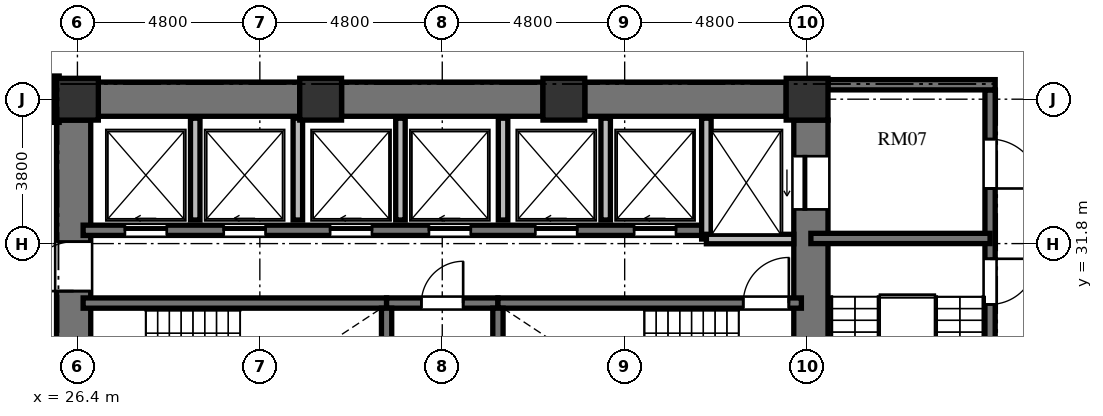
"""IFC4 building model, lengths in metres.
Left out: names, types, materials, properties, quantities, classifications, styles, units other than length and angle.
Written with IfcOpenShell. Run it as: python <this file> out.ifc"""

import sys

from ifc_helpers import new_model, si_unit, direction, frame, frame_2d, origin, origin_2d, place, context, subcontext, project, spatial, rectangle, extrude, element, fill, save


model = new_model("IFC4")
c1 = context("Model", 3, precision=1e-05, world=origin(), true_north=direction((0.0, 1.0)))
c2 = subcontext(c1, "Body", "Model", "MODEL_VIEW")
j1 = project(units=[si_unit("LENGTHUNIT", "METRE"), si_unit("PLANEANGLEUNIT", "RADIAN")], contexts=[c1])
p1 = place(None, origin())
s1 = spatial("IfcSite", under=j1, at=p1, CompositionType="ELEMENT")
p2 = place(p1, origin())
s2 = spatial("IfcBuilding", under=s1, at=p2, CompositionType="ELEMENT")
p3 = place(p2, frame((0.0, 0.0, 76.272)))
s3 = spatial("IfcBuildingStorey", under=s2, at=p3, CompositionType="ELEMENT", Elevation=76.272)
for number, where, z_axis, x_axis in (
    (1, (45.6, 35.6, 0.0), (0.0, 0.0, 1.0), (1.0, 0.0, 0.0)),
    (2, (39.2, 35.6, 0.0), (0.0, 0.0, 1.0), (1.0, 0.0, 0.0)),
    (3, (32.8, 35.6, 0.0), (0.0, 0.0, 1.0), (1.0, 0.0, 0.0)),
    (4, (26.4, 35.6, 0.0), (0.0, 0.0, 1.0), (1.0, 0.0, 0.0)),
):
    element("IfcColumn", number, at=place(p3, frame(where, z_axis=z_axis, x_axis=x_axis)), inside=s3, PredefinedType="COLUMN", context=c2, shape_type="SweptSolid", body=[
        extrude(rectangle(XDim=1.1, YDim=1.1, at=origin_2d()), origin(), (0.0, 0.0, 1.0), 5.472),
    ])
p4 = place(p3, frame((26.3, 20.95, 0.0), z_axis=(0.0, 0.0, 1.0), x_axis=(0.0, 1.0, 0.0)))
e5 = element("IfcWall", 5, at=p4, inside=s3, PredefinedType="SHEAR", context=c2, shape_type="SweptSolid", body=[
    extrude(rectangle(XDim=14.1, YDim=0.9, at=frame_2d((7.05, 0.0))), origin(), (0.0, 0.0, 1.0), 5.472),
])
p5 = place(p4, frame((6.5, 0.0, 0.0)))
e6 = element("IfcOpeningElement", 6, at=p5, cuts=e5, PredefinedType="OPENING", context=c2, shape_type="SweptSolid", body=[
    extrude(rectangle(XDim=1.2, YDim=2.15, at=frame_2d((0.6, 1.075))), frame((0.0, 0.46, 0.0), z_axis=(0.0, -1.0, 0.0), x_axis=(1.0, 0.0, 0.0)), (0.0, 0.0, 1.0), 0.92),
])
p6 = place(p4, frame((9.6, 0.0, 0.0)))
e7 = element("IfcOpeningElement", 7, at=p6, cuts=e5, PredefinedType="OPENING", context=c2, shape_type="SweptSolid", body=[
    extrude(rectangle(XDim=1.3, YDim=2.2, at=frame_2d((0.65, 1.1))), frame((0.0, 0.46, 0.0), z_axis=(0.0, -1.0, 0.0), x_axis=(1.0, 0.0, 0.0)), (0.0, 0.0, 1.0), 0.92),
])
p7 = place(p4, frame((3.26, 0.0, 0.0)))
e8 = element("IfcOpeningElement", 8, at=p7, cuts=e5, PredefinedType="OPENING", context=c2, shape_type="SweptSolid", body=[
    extrude(rectangle(XDim=1.3, YDim=2.2, at=frame_2d((0.65, 1.1))), frame((0.0, 0.46, 0.0), z_axis=(0.0, -1.0, 0.0), x_axis=(1.0, 0.0, 0.0)), (0.0, 0.0, 1.0), 0.92),
])
p8 = place(p3, frame((45.7, 20.95, 0.0), z_axis=(0.0, 0.0, 1.0), x_axis=(0.0, 1.0, 0.0)))
e9 = element("IfcWall", 9, at=p8, inside=s3, PredefinedType="SHEAR", context=c2, shape_type="SweptSolid", body=[
    extrude(rectangle(XDim=14.1, YDim=0.9, at=frame_2d((7.05, 0.0))), origin(), (0.0, 0.0, 1.0), 5.472),
])
p9 = place(p8, frame((11.75, 0.0, 0.0)))
e10 = element("IfcOpeningElement", 10, at=p9, cuts=e9, PredefinedType="OPENING", context=c2, shape_type="SweptSolid", body=[
    extrude(rectangle(XDim=1.4, YDim=2.3, at=frame_2d((0.7, 1.15))), frame((0.0, 0.46, 0.0), z_axis=(0.0, -1.0, 0.0), x_axis=(1.0, 0.0, 0.0)), (0.0, 0.0, 1.0), 0.92),
])
p10 = place(p8, frame((0.95, 0.0, 0.0)))
e11 = element("IfcOpeningElement", 11, at=p10, cuts=e9, PredefinedType="OPENING", context=c2, shape_type="SweptSolid", body=[
    extrude(rectangle(XDim=1.4, YDim=2.3, at=frame_2d((0.7, 1.15))), frame((0.0, 0.46, 0.0), z_axis=(0.0, -1.0, 0.0), x_axis=(1.0, 0.0, 0.0)), (0.0, 0.0, 1.0), 0.92),
])
p11 = place(p3, frame((26.95, 35.6, 0.0), z_axis=(0.0, 0.0, 1.0), x_axis=(1.0, 0.0, 0.0)))
e12 = element("IfcWall", 12, at=p11, inside=s3, PredefinedType="SHEAR", context=c2, shape_type="SweptSolid", body=[
    extrude(rectangle(XDim=5.3, YDim=0.9, at=frame_2d((2.65, 0.0))), origin(), (0.0, 0.0, 1.0), 5.472),
])
p12 = place(p3, frame((33.35, 35.6, 0.0), z_axis=(0.0, 0.0, 1.0), x_axis=(1.0, 0.0, 0.0)))
e13 = element("IfcWall", 13, at=p12, inside=s3, PredefinedType="SHEAR", context=c2, shape_type="SweptSolid", body=[
    extrude(rectangle(XDim=5.3, YDim=0.9, at=frame_2d((2.65, 0.0))), origin(), (0.0, 0.0, 1.0), 5.472),
])
p13 = place(p3, frame((39.75, 35.6, 0.0), z_axis=(0.0, 0.0, 1.0), x_axis=(1.0, 0.0, 0.0)))
e14 = element("IfcWall", 14, at=p13, inside=s3, PredefinedType="SHEAR", context=c2, shape_type="SweptSolid", body=[
    extrude(rectangle(XDim=5.3, YDim=0.9, at=frame_2d((2.65, 0.0))), origin(), (0.0, 0.0, 1.0), 5.472),
])
p14 = place(p3, frame((26.55, 30.235, 0.0), z_axis=(0.0, 0.0, 1.0), x_axis=(1.0, 0.0, 0.0)))
e15 = element("IfcWall", 15, at=p14, inside=s3, PredefinedType="SHEAR", context=c2, shape_type="SweptSolid", body=[
    extrude(rectangle(XDim=7.985, YDim=0.27, at=frame_2d((3.992, 0.0))), origin(), (0.0, 0.0, 1.0), 5.472),
])
p15 = place(p3, frame((34.535, 30.235, 0.0), z_axis=(0.0, 0.0, 1.0), x_axis=(1.0, 0.0, 0.0)))
e16 = element("IfcWall", 16, at=p15, inside=s3, PredefinedType="SHEAR", context=c2, shape_type="SweptSolid", body=[
    extrude(rectangle(XDim=2.93, YDim=0.27, at=frame_2d((1.465, 0.0))), origin(), (0.0, 0.0, 1.0), 5.472),
])
p16 = place(p15, frame((0.915, 0.0, 0.0)))
e17 = element("IfcOpeningElement", 17, at=p16, cuts=e16, PredefinedType="OPENING", context=c2, shape_type="SweptSolid", body=[
    extrude(rectangle(XDim=1.1, YDim=2.15, at=frame_2d((0.55, 1.075))), frame((0.0, 0.145, 0.0), z_axis=(0.0, -1.0, 0.0), x_axis=(1.0, 0.0, 0.0)), (0.0, 0.0, 1.0), 0.29),
])
p17 = place(p3, frame((37.465, 30.235, 0.0), z_axis=(0.0, 0.0, 1.0), x_axis=(1.0, 0.0, 0.0)))
e18 = element("IfcWall", 18, at=p17, inside=s3, PredefinedType="SHEAR", context=c2, shape_type="SweptSolid", body=[
    extrude(rectangle(XDim=7.985, YDim=0.27, at=frame_2d((3.992, 0.0))), origin(), (0.0, 0.0, 1.0), 5.472),
])
p18 = place(p17, frame((6.455, 0.0, 0.0)))
e19 = element("IfcOpeningElement", 19, at=p18, cuts=e18, PredefinedType="OPENING", context=c2, shape_type="SweptSolid", body=[
    extrude(rectangle(XDim=1.2, YDim=2.15, at=frame_2d((0.6, 1.075))), frame((0.0, 0.145, 0.0), z_axis=(0.0, -1.0, 0.0), x_axis=(1.0, 0.0, 0.0)), (0.0, 0.0, 1.0), 0.29),
])
for number, where, z_axis, x_axis in (
    (20, (34.535, 26.02, 0.0), (0.0, 0.0, 1.0), (0.0, 1.0, 0.0)),
    (21, (37.465, 26.02, 0.0), (0.0, 0.0, 1.0), (0.0, 1.0, 0.0)),
):
    element("IfcWall", number, at=place(p3, frame(where, z_axis=z_axis, x_axis=x_axis)), inside=s3, PredefinedType="SHEAR", context=c2, shape_type="SweptSolid", body=[
        extrude(rectangle(XDim=4.08, YDim=0.27, at=frame_2d((2.04, 0.0))), origin(), (0.0, 0.0, 1.0), 5.472),
    ])
p19 = place(p3, frame((26.55, 32.15, 0.0), z_axis=(0.0, 0.0, 1.0), x_axis=(1.0, 0.0, 0.0)))
e22 = element("IfcWall", 22, at=p19, inside=s3, PredefinedType="SHEAR", context=c2, shape_type="SweptSolid", body=[
    extrude(rectangle(XDim=16.4, YDim=0.27, at=frame_2d((8.2, 0.0))), origin(), (0.0, 0.0, 1.0), 5.472),
])
p20 = place(p19, frame((1.1, 0.0, 0.0)))
e23 = element("IfcOpeningElement", 23, at=p20, cuts=e22, PredefinedType="OPENING", context=c2, shape_type="SweptSolid", body=[
    extrude(rectangle(XDim=1.1, YDim=2.2, at=frame_2d((0.55, 1.1))), frame((0.0, 0.145, 0.0), z_axis=(0.0, -1.0, 0.0), x_axis=(1.0, 0.0, 0.0)), (0.0, 0.0, 1.0), 0.29),
])
p21 = place(p19, frame((3.7, 0.0, 0.0)))
e24 = element("IfcOpeningElement", 24, at=p21, cuts=e22, PredefinedType="OPENING", context=c2, shape_type="SweptSolid", body=[
    extrude(rectangle(XDim=1.1, YDim=2.2, at=frame_2d((0.55, 1.1))), frame((0.0, 0.145, 0.0), z_axis=(0.0, -1.0, 0.0), x_axis=(1.0, 0.0, 0.0)), (0.0, 0.0, 1.0), 0.29),
])
p22 = place(p19, frame((6.5, 0.0, 0.0)))
e25 = element("IfcOpeningElement", 25, at=p22, cuts=e22, PredefinedType="OPENING", context=c2, shape_type="SweptSolid", body=[
    extrude(rectangle(XDim=1.1, YDim=2.2, at=frame_2d((0.55, 1.1))), frame((0.0, 0.145, 0.0), z_axis=(0.0, -1.0, 0.0), x_axis=(1.0, 0.0, 0.0)), (0.0, 0.0, 1.0), 0.29),
])
p23 = place(p19, frame((9.1, 0.0, 0.0)))
e26 = element("IfcOpeningElement", 26, at=p23, cuts=e22, PredefinedType="OPENING", context=c2, shape_type="SweptSolid", body=[
    extrude(rectangle(XDim=1.1, YDim=2.2, at=frame_2d((0.55, 1.1))), frame((0.0, 0.145, 0.0), z_axis=(0.0, -1.0, 0.0), x_axis=(1.0, 0.0, 0.0)), (0.0, 0.0, 1.0), 0.29),
])
p24 = place(p19, frame((11.9, 0.0, 0.0)))
e27 = element("IfcOpeningElement", 27, at=p24, cuts=e22, PredefinedType="OPENING", context=c2, shape_type="SweptSolid", body=[
    extrude(rectangle(XDim=1.1, YDim=2.2, at=frame_2d((0.55, 1.1))), frame((0.0, 0.145, 0.0), z_axis=(0.0, -1.0, 0.0), x_axis=(1.0, 0.0, 0.0)), (0.0, 0.0, 1.0), 0.29),
])
p25 = place(p19, frame((14.5, 0.0, 0.0)))
e28 = element("IfcOpeningElement", 28, at=p25, cuts=e22, PredefinedType="OPENING", context=c2, shape_type="SweptSolid", body=[
    extrude(rectangle(XDim=1.1, YDim=2.2, at=frame_2d((0.55, 1.1))), frame((0.0, 0.145, 0.0), z_axis=(0.0, -1.0, 0.0), x_axis=(1.0, 0.0, 0.0)), (0.0, 0.0, 1.0), 0.29),
])
p26 = place(p3, frame((42.95, 31.92, 0.0), z_axis=(0.0, 0.0, 1.0), x_axis=(0.0, 1.0, 0.0)))
e29 = element("IfcWall", 29, at=p26, inside=s3, PredefinedType="SOLIDWALL", context=c2, shape_type="SweptSolid", body=[
    extrude(rectangle(XDim=3.18, YDim=0.25, at=frame_2d((1.59, 0.0))), origin(), (0.0, 0.0, 1.0), 5.022),
])
p27 = place(p3, frame((42.95, 31.92, 0.0), z_axis=(0.0, 0.0, 1.0), x_axis=(1.0, 0.0, 0.0)))
e30 = element("IfcWall", 30, at=p27, inside=s3, PredefinedType="SOLIDWALL", context=c2, shape_type="SweptSolid", body=[
    extrude(rectangle(XDim=2.3, YDim=0.25, at=frame_2d((1.15, 0.0))), origin(), (0.0, 0.0, 1.0), 5.022),
])
for number, where, z_axis, x_axis in (
    (31, (29.5, 32.42, 0.0), (0.0, 0.0, 1.0), (0.0, 1.0, 0.0)),
    (32, (32.2, 32.42, 0.0), (0.0, 0.0, 1.0), (0.0, 1.0, 0.0)),
    (33, (34.9, 32.42, 0.0), (0.0, 0.0, 1.0), (0.0, 1.0, 0.0)),
    (34, (37.6, 32.42, 0.0), (0.0, 0.0, 1.0), (0.0, 1.0, 0.0)),
    (35, (40.3, 32.42, 0.0), (0.0, 0.0, 1.0), (0.0, 1.0, 0.0)),
):
    element("IfcWall", number, at=place(p3, frame(where, z_axis=z_axis, x_axis=x_axis)), inside=s3, PredefinedType="SOLIDWALL", context=c2, shape_type="SweptSolid", body=[
        extrude(rectangle(XDim=2.68, YDim=0.25, at=frame_2d((1.34, 0.0))), origin(), (0.0, 0.0, 1.0), 5.022),
    ])
p28 = place(p3, frame((50.415, 35.845, 0.0), z_axis=(0.0, 0.0, 1.0), x_axis=(0.0, -1.0, 0.0)))
e36 = element("IfcWall", 36, at=p28, inside=s3, PredefinedType="SHEAR", context=c2, shape_type="SweptSolid", body=[
    extrude(rectangle(XDim=15.825, YDim=0.27, at=frame_2d((7.913, 0.0))), origin(), (0.0, 0.0, 1.0), 5.472),
])
p29 = place(p28, frame((4.445, 0.0, 0.0)))
e37 = element("IfcOpeningElement", 37, at=p29, cuts=e36, PredefinedType="OPENING", context=c2, shape_type="SweptSolid", body=[
    extrude(rectangle(XDim=1.2, YDim=2.15, at=frame_2d((0.6, 1.075))), frame((0.0, 0.145, 0.0), z_axis=(0.0, -1.0, 0.0), x_axis=(1.0, 0.0, 0.0)), (0.0, 0.0, 1.0), 0.29),
])
p30 = place(p28, frame((1.295, 0.0, 0.0)))
e38 = element("IfcOpeningElement", 38, at=p30, cuts=e36, PredefinedType="OPENING", context=c2, shape_type="SweptSolid", body=[
    extrude(rectangle(XDim=1.3, YDim=2.2, at=frame_2d((0.65, 1.1))), frame((0.0, 0.145, 0.0), z_axis=(0.0, -1.0, 0.0), x_axis=(1.0, 0.0, 0.0)), (0.0, 0.0, 1.0), 0.29),
])
p31 = place(p28, frame((13.095, 0.0, 0.0)))
e39 = element("IfcOpeningElement", 39, at=p31, cuts=e36, PredefinedType="OPENING", context=c2, shape_type="SweptSolid", body=[
    extrude(rectangle(XDim=1.3, YDim=2.2, at=frame_2d((0.65, 1.1))), frame((0.0, 0.145, 0.0), z_axis=(0.0, -1.0, 0.0), x_axis=(1.0, 0.0, 0.0)), (0.0, 0.0, 1.0), 0.29),
])
p32 = place(p3, frame((46.15, 35.98, 0.0), z_axis=(0.0, 0.0, 1.0), x_axis=(1.0, 0.0, 0.0)))
e40 = element("IfcWall", 40, at=p32, inside=s3, PredefinedType="SHEAR", context=c2, shape_type="SweptSolid", body=[
    extrude(rectangle(XDim=4.4, YDim=0.27, at=frame_2d((2.2, 0.0))), origin(), (0.0, 0.0, 1.0), 5.472),
])
p33 = place(p3, frame((45.7, 31.935, 0.0), z_axis=(0.0, 0.0, 1.0), x_axis=(1.0, 0.0, 0.0)))
e41 = element("IfcWall", 41, at=p33, inside=s3, PredefinedType="SHEAR", context=c2, shape_type="SweptSolid", body=[
    extrude(rectangle(XDim=4.715, YDim=0.27, at=frame_2d((2.357, 0.0))), origin(), (0.0, 0.0, 1.0), 5.472),
])
p34 = place(p3, frame((25.83, 36.21, 0.0), z_axis=(0.0, 0.0, 1.0), x_axis=(0.0, -1.0, 0.0)))
e42 = element("IfcWall", 42, at=p34, inside=s3, PredefinedType="PARTITIONING", context=c2, shape_type="SweptSolid", body=[
    extrude(rectangle(XDim=1.22, YDim=0.18, at=frame_2d((0.61, 0.0))), origin(), (0.0, 0.0, 1.0), 5.022),
])
p35 = place(p18, origin())
e43 = element("IfcDoor", 43, at=p35, inside=s3, OperationType="SINGLE_SWING_RIGHT", PredefinedType="DOOR", context=c2, shape_type="SweptSolid", body=[
    extrude(rectangle(XDim=1.2, YDim=2.15, at=frame_2d((0.6, 1.075))), frame((0.0, 0.025, 0.0), z_axis=(0.0, -1.0, 0.0), x_axis=(1.0, 0.0, 0.0)), (0.0, 0.0, 1.0), 0.05),
])
fill(e19, e43)
p36 = place(p16, origin())
e44 = element("IfcDoor", 44, at=p36, inside=s3, OperationType="SINGLE_SWING_RIGHT", PredefinedType="DOOR", context=c2, shape_type="SweptSolid", body=[
    extrude(rectangle(XDim=1.1, YDim=2.15, at=frame_2d((0.55, 1.075))), frame((0.0, 0.025, 0.0), z_axis=(0.0, -1.0, 0.0), x_axis=(1.0, 0.0, 0.0)), (0.0, 0.0, 1.0), 0.05),
])
fill(e17, e44)
p37 = place(p6, origin())
e45 = element("IfcDoor", 45, at=p37, inside=s3, OperationType="SINGLE_SWING_LEFT", PredefinedType="DOOR", context=c2, shape_type="SweptSolid", body=[
    extrude(rectangle(XDim=1.3, YDim=2.2, at=frame_2d((0.65, 1.1))), frame((0.0, 0.025, 0.0), z_axis=(0.0, -1.0, 0.0), x_axis=(1.0, 0.0, 0.0)), (0.0, 0.0, 1.0), 0.05),
])
fill(e7, e45)
p38 = place(p20, origin())
e46 = element("IfcDoor", 46, at=p38, inside=s3, OperationType="SLIDING_TO_LEFT", PredefinedType="DOOR", context=c2, shape_type="SweptSolid", body=[
    extrude(rectangle(XDim=1.1, YDim=2.2, at=frame_2d((0.55, 1.1))), frame((0.0, 0.025, 0.0), z_axis=(0.0, -1.0, 0.0), x_axis=(1.0, 0.0, 0.0)), (0.0, 0.0, 1.0), 0.05),
])
fill(e23, e46)
p39 = place(p21, origin())
e47 = element("IfcDoor", 47, at=p39, inside=s3, OperationType="SLIDING_TO_LEFT", PredefinedType="DOOR", context=c2, shape_type="SweptSolid", body=[
    extrude(rectangle(XDim=1.1, YDim=2.2, at=frame_2d((0.55, 1.1))), frame((0.0, 0.025, 0.0), z_axis=(0.0, -1.0, 0.0), x_axis=(1.0, 0.0, 0.0)), (0.0, 0.0, 1.0), 0.05),
])
fill(e24, e47)
p40 = place(p22, origin())
e48 = element("IfcDoor", 48, at=p40, inside=s3, OperationType="SLIDING_TO_LEFT", PredefinedType="DOOR", context=c2, shape_type="SweptSolid", body=[
    extrude(rectangle(XDim=1.1, YDim=2.2, at=frame_2d((0.55, 1.1))), frame((0.0, 0.025, 0.0), z_axis=(0.0, -1.0, 0.0), x_axis=(1.0, 0.0, 0.0)), (0.0, 0.0, 1.0), 0.05),
])
fill(e25, e48)
p41 = place(p23, origin())
e49 = element("IfcDoor", 49, at=p41, inside=s3, OperationType="SLIDING_TO_LEFT", PredefinedType="DOOR", context=c2, shape_type="SweptSolid", body=[
    extrude(rectangle(XDim=1.1, YDim=2.2, at=frame_2d((0.55, 1.1))), frame((0.0, 0.025, 0.0), z_axis=(0.0, -1.0, 0.0), x_axis=(1.0, 0.0, 0.0)), (0.0, 0.0, 1.0), 0.05),
])
fill(e26, e49)
p42 = place(p24, origin())
e50 = element("IfcDoor", 50, at=p42, inside=s3, OperationType="SLIDING_TO_LEFT", PredefinedType="DOOR", context=c2, shape_type="SweptSolid", body=[
    extrude(rectangle(XDim=1.1, YDim=2.2, at=frame_2d((0.55, 1.1))), frame((0.0, 0.025, 0.0), z_axis=(0.0, -1.0, 0.0), x_axis=(1.0, 0.0, 0.0)), (0.0, 0.0, 1.0), 0.05),
])
fill(e27, e50)
p43 = place(p25, origin())
e51 = element("IfcDoor", 51, at=p43, inside=s3, OperationType="SLIDING_TO_LEFT", PredefinedType="DOOR", context=c2, shape_type="SweptSolid", body=[
    extrude(rectangle(XDim=1.1, YDim=2.2, at=frame_2d((0.55, 1.1))), frame((0.0, 0.025, 0.0), z_axis=(0.0, -1.0, 0.0), x_axis=(1.0, 0.0, 0.0)), (0.0, 0.0, 1.0), 0.05),
])
fill(e28, e51)
p44 = place(p9, origin())
e52 = element("IfcDoor", 52, at=p44, inside=s3, OperationType="SLIDING_TO_LEFT", PredefinedType="DOOR", context=c2, shape_type="SweptSolid", body=[
    extrude(rectangle(XDim=1.4, YDim=2.3, at=frame_2d((0.7, 1.15))), frame((0.0, 0.025, 0.0), z_axis=(0.0, -1.0, 0.0), x_axis=(1.0, 0.0, 0.0)), (0.0, 0.0, 1.0), 0.05),
])
fill(e10, e52)
p45 = place(p29, origin())
e53 = element("IfcDoor", 53, at=p45, inside=s3, OperationType="SINGLE_SWING_LEFT", PredefinedType="DOOR", context=c2, shape_type="SweptSolid", body=[
    extrude(rectangle(XDim=1.2, YDim=2.15, at=frame_2d((0.6, 1.075))), frame((0.0, 0.025, 0.0), z_axis=(0.0, -1.0, 0.0), x_axis=(1.0, 0.0, 0.0)), (0.0, 0.0, 1.0), 0.05),
])
fill(e37, e53)
p46 = place(p30, origin())
e54 = element("IfcDoor", 54, at=p46, inside=s3, OperationType="SINGLE_SWING_RIGHT", PredefinedType="DOOR", context=c2, shape_type="SweptSolid", body=[
    extrude(rectangle(XDim=1.3, YDim=2.2, at=frame_2d((0.65, 1.1))), frame((0.0, 0.025, 0.0), z_axis=(0.0, -1.0, 0.0), x_axis=(1.0, 0.0, 0.0)), (0.0, 0.0, 1.0), 0.05),
])
fill(e38, e54)
save(model, sys.argv[1])
